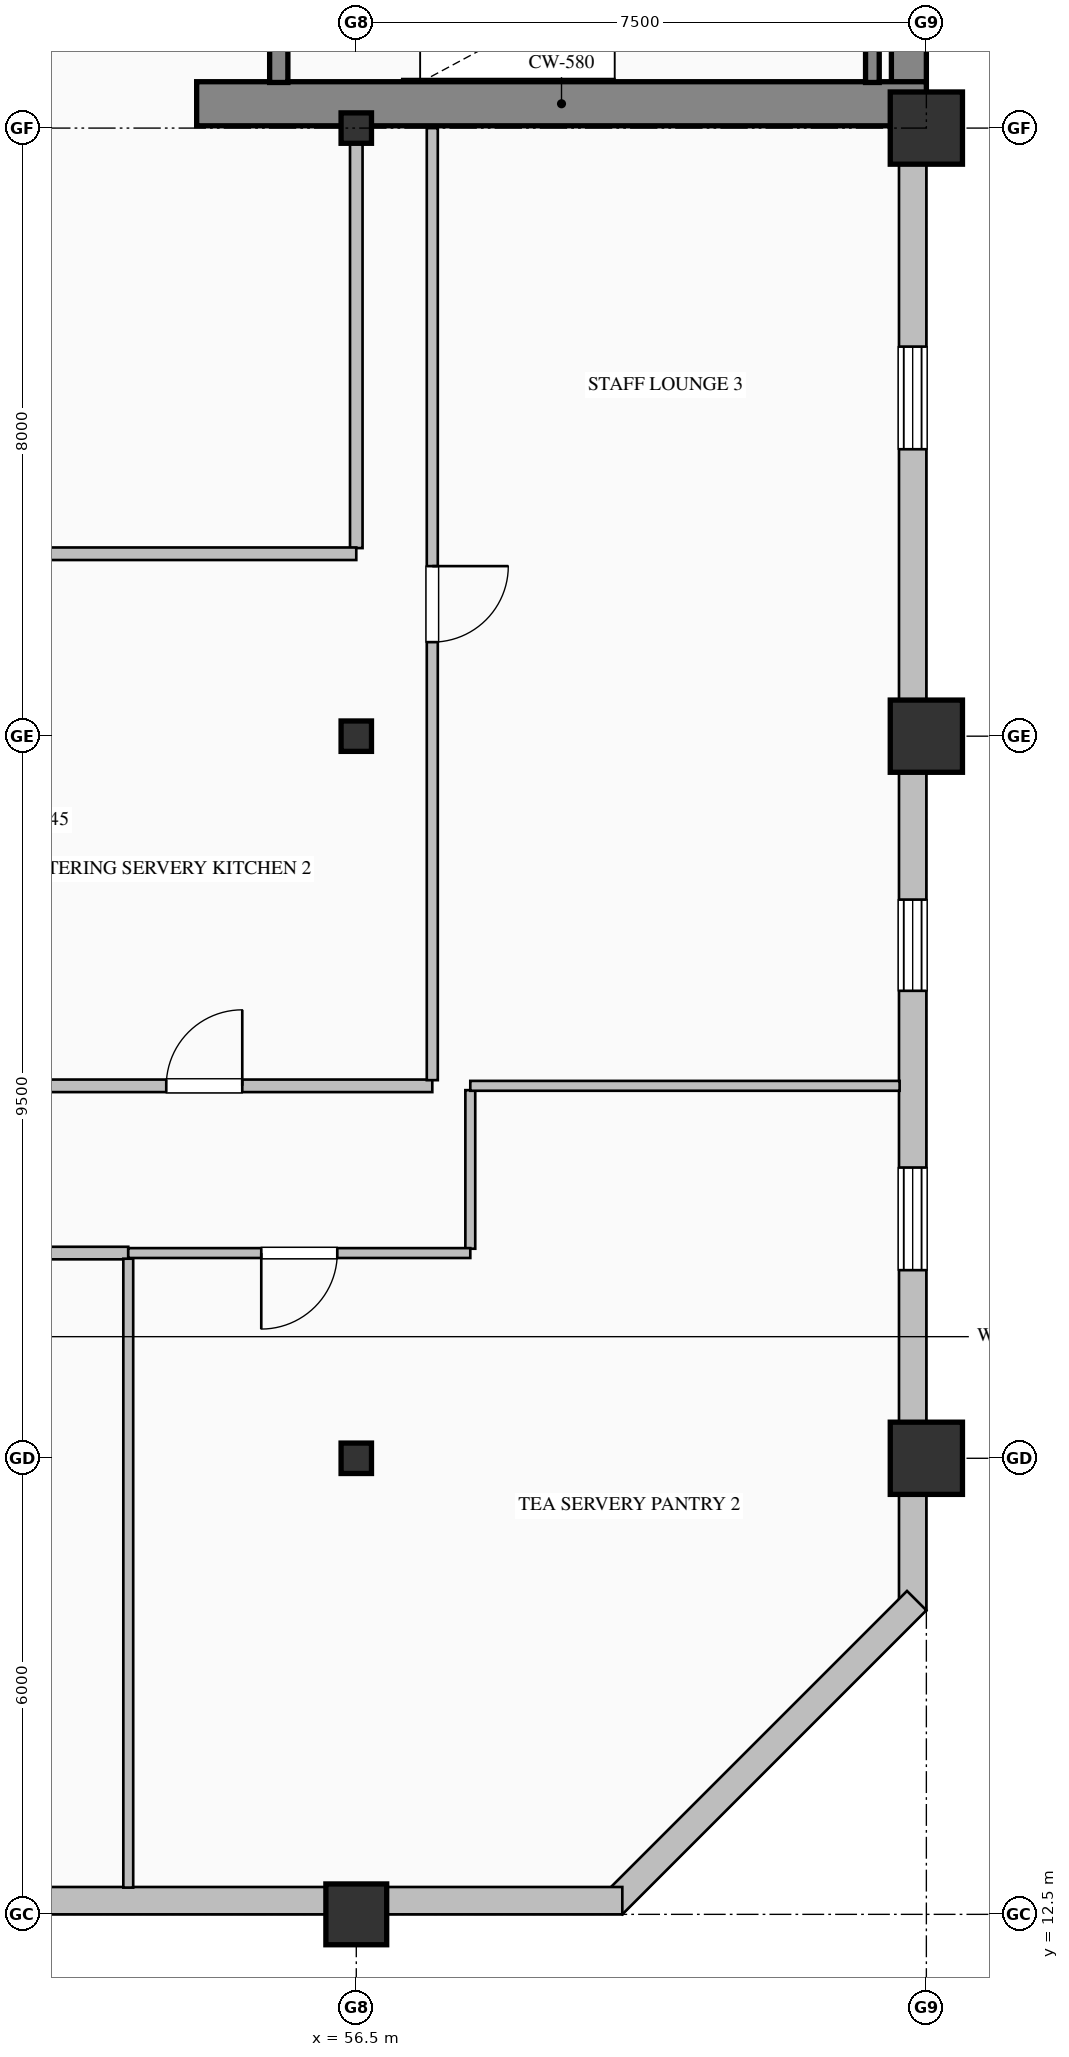
"""IFC4 building model, lengths in metres.
Left out: names, types, materials, properties, quantities, classifications, styles, units other than length and angle.
Written with IfcOpenShell. Run it as: python <this file> out.ifc"""

import sys

from ifc_helpers import new_model, si_unit, direction, frame, frame_2d, origin, origin_2d, place, context, subcontext, project, spatial, rectangle, hollow_rectangle, i_section, extrude, element, fill, save


model = new_model("IFC4")
c1 = context("Model", 3, precision=1e-05, world=origin(), true_north=direction((0.0, 1.0)))
c2 = subcontext(c1, "Body", "Model", "MODEL_VIEW")
j1 = project(units=[si_unit("LENGTHUNIT", "METRE"), si_unit("PLANEANGLEUNIT", "RADIAN")], contexts=[c1])
p1 = place(None, origin())
s1 = spatial("IfcSite", under=j1, at=p1, CompositionType="ELEMENT")
p2 = place(p1, origin())
s2 = spatial("IfcBuilding", under=s1, at=p2, CompositionType="ELEMENT")
p3 = place(p2, frame((0.0, 0.0, 241.8)))
s3 = spatial("IfcBuildingStorey", under=s2, at=p3, CompositionType="ELEMENT", Elevation=241.8)
p4 = place(p3, frame((63.77, 36.32, 0.0), z_axis=(0.0, 0.0, 1.0), x_axis=(0.0, 1.0, 0.0)))
e1 = element("IfcWall", 1, at=p4, inside=s3, PredefinedType="SHEAR", context=c2, shape_type="SweptSolid", body=[
    extrude(rectangle(XDim=15.22, YDim=0.46, at=frame_2d((7.61, 0.0))), origin(), (0.0, 0.0, 1.0), 3.775),
])
p5 = place(p3, frame((54.4, 36.32, 0.0), z_axis=(0.0, 0.0, 1.0), x_axis=(1.0, 0.0, 0.0)))
e2 = element("IfcWall", 2, at=p5, inside=s3, PredefinedType="SHEAR", context=c2, shape_type="SweptSolid", body=[
    extrude(rectangle(XDim=9.6, YDim=0.58, at=frame_2d((4.8, 0.0))), origin(), (0.0, 0.0, 1.0), 4.0),
])
p6 = place(p3, frame((56.5, 12.5, 0.0), z_axis=(0.0, 0.0, 1.0), x_axis=(1.0, 0.0, 0.0)))
e3 = element("IfcColumn", 3, at=p6, inside=s3, PredefinedType="COLUMN", context=c2, shape_type="SweptSolid", body=[
    extrude(hollow_rectangle(XDim=0.8, YDim=0.8, WallThickness=0.032, at=origin_2d()), origin(), (0.0, 0.0, 1.0), 4.0),
])
for number, where, z_axis, x_axis in (
    (4, (56.5, 18.5, 0.0), (0.0, 0.0, 1.0), (1.0, 0.0, 0.0)),
    (5, (56.5, 28.0, 0.0), (0.0, 0.0, 1.0), (1.0, 0.0, 0.0)),
    (6, (56.5, 36.0, 0.0), (0.0, 0.0, 1.0), (1.0, 0.0, 0.0)),
):
    element("IfcColumn", number, at=place(p3, frame(where, z_axis=z_axis, x_axis=x_axis)), inside=s3, PredefinedType="COLUMN", context=c2, shape_type="SweptSolid", body=[
        extrude(i_section(OverallWidth=0.4, OverallDepth=0.4, WebThickness=0.013, FlangeThickness=0.021, FilletRadius=0.022, at=origin_2d()), origin(), (0.0, 0.0, 1.0), 4.0),
    ])
for number, where, z_axis, x_axis in (
    (7, (64.0, 18.5, 0.0), (0.0, 0.0, 1.0), (1.0, 0.0, 0.0)),
    (8, (64.0, 28.0, 0.0), (0.0, 0.0, 1.0), (1.0, 0.0, 0.0)),
    (9, (64.0, 36.0, 0.0), (0.0, 0.0, 1.0), (1.0, 0.0, 0.0)),
):
    element("IfcColumn", number, at=place(p3, frame(where, z_axis=z_axis, x_axis=x_axis)), inside=s3, PredefinedType="COLUMN", context=c2, shape_type="SweptSolid", body=[
        extrude(hollow_rectangle(XDim=0.95, YDim=0.95, WallThickness=0.036, at=origin_2d()), origin(), (0.0, 0.0, 1.0), 4.0),
    ])
p7 = place(p3, frame((63.82, 36.05, 0.0), z_axis=(0.0, 0.0, 1.0), x_axis=(0.0, -1.0, 0.0)))
e10 = element("IfcWall", 10, at=p7, inside=s3, PredefinedType="SOLIDWALL", context=c2, shape_type="SweptSolid", body=[
    extrude(rectangle(XDim=19.55, YDim=0.36, at=frame_2d((9.775, 0.0))), origin(), (0.0, 0.0, 1.0), 3.325),
])
p8 = place(p7, frame((2.925, 0.0, 0.9)))
e11 = element("IfcOpeningElement", 11, at=p8, cuts=e10, PredefinedType="OPENING", context=c2, shape_type="SweptSolid", body=[
    extrude(rectangle(XDim=1.35, YDim=1.85, at=frame_2d((0.675, 0.925))), frame((0.0, 0.19, 0.0), z_axis=(0.0, -1.0, 0.0), x_axis=(1.0, 0.0, 0.0)), (0.0, 0.0, 1.0), 0.38),
])
p9 = place(p7, frame((10.2, 0.0, 0.9)))
e12 = element("IfcOpeningElement", 12, at=p9, cuts=e10, PredefinedType="OPENING", context=c2, shape_type="SweptSolid", body=[
    extrude(rectangle(XDim=1.2, YDim=1.85, at=frame_2d((0.6, 0.925))), frame((0.0, 0.19, 0.0), z_axis=(0.0, -1.0, 0.0), x_axis=(1.0, 0.0, 0.0)), (0.0, 0.0, 1.0), 0.38),
])
p10 = place(p7, frame((13.725, 0.0, 0.9)))
e13 = element("IfcOpeningElement", 13, at=p10, cuts=e10, PredefinedType="OPENING", context=c2, shape_type="SweptSolid", body=[
    extrude(rectangle(XDim=1.35, YDim=1.85, at=frame_2d((0.675, 0.925))), frame((0.0, 0.19, 0.0), z_axis=(0.0, -1.0, 0.0), x_axis=(1.0, 0.0, 0.0)), (0.0, 0.0, 1.0), 0.38),
])
p11 = place(p3, frame((63.873, 16.627, 0.0), z_axis=(0.0, 0.0, 1.0), x_axis=(-0.707106781187, -0.707106781187, 0.0)))
e14 = element("IfcWall", 14, at=p11, inside=s3, PredefinedType="SOLIDWALL", context=c2, shape_type="SweptSolid", body=[
    extrude(rectangle(XDim=5.657, YDim=0.36, at=frame_2d((2.828, 0.0))), origin(), (0.0, 0.0, 1.0), 3.775),
])
p12 = place(p3, frame((60.0, 12.68, 0.0), z_axis=(0.0, 0.0, 1.0), x_axis=(-1.0, 0.0, 0.0)))
e15 = element("IfcWall", 15, at=p12, inside=s3, PredefinedType="SOLIDWALL", context=c2, shape_type="SweptSolid", body=[
    extrude(rectangle(XDim=15.5, YDim=0.36, at=frame_2d((7.75, 0.0))), origin(), (0.0, 0.0, 1.0), 3.325),
])
p13 = place(p3, frame((55.48, 39.75, 0.0), z_axis=(0.0, 0.0, 1.0), x_axis=(0.0, -1.0, 0.0)))
e16 = element("IfcWall", 16, at=p13, inside=s3, PredefinedType="SOLIDWALL", context=c2, shape_type="SweptSolid", body=[
    extrude(rectangle(XDim=3.15, YDim=0.24, at=frame_2d((1.575, 0.0))), origin(), (0.0, 0.0, 1.0), 4.0),
])
p14 = place(p13, frame((1.0, 0.0, 0.0)))
e17 = element("IfcOpeningElement", 17, at=p14, cuts=e16, PredefinedType="OPENING", context=c2, shape_type="SweptSolid", body=[
    extrude(rectangle(XDim=1.15, YDim=2.2, at=frame_2d((0.575, 1.1))), frame((0.0, 0.13, 0.0), z_axis=(0.0, -1.0, 0.0), x_axis=(1.0, 0.0, 0.0)), (0.0, 0.0, 1.0), 0.26),
])
p15 = place(p3, frame((63.29, 36.6, 0.0), z_axis=(0.0, 0.0, 1.0), x_axis=(0.0, 1.0, 0.0)))
e18 = element("IfcWall", 18, at=p15, inside=s3, PredefinedType="SOLIDWALL", context=c2, shape_type="SweptSolid", body=[
    extrude(rectangle(XDim=3.15, YDim=0.18, at=frame_2d((1.575, 0.0))), origin(), (0.0, 0.0, 1.0), 4.0),
])
p16 = place(p3, frame((56.5, 36.0, 0.0), z_axis=(0.0, 0.0, 1.0), x_axis=(0.0, -1.0, 0.0)))
e19 = element("IfcWall", 19, at=p16, inside=s3, PredefinedType="PARTITIONING", context=c2, shape_type="SweptSolid", body=[
    extrude(rectangle(XDim=5.525, YDim=0.165, at=frame_2d((2.763, 0.0))), origin(), (0.0, 0.0, 1.0), 3.179),
])
p17 = place(p3, frame((56.5, 30.4, 0.0), z_axis=(0.0, 0.0, 1.0), x_axis=(-1.0, 0.0, 0.0)))
e20 = element("IfcWall", 20, at=p17, inside=s3, PredefinedType="PARTITIONING", context=c2, shape_type="SweptSolid", body=[
    extrude(rectangle(XDim=5.0, YDim=0.165, at=frame_2d((2.5, 0.0))), origin(), (0.0, 0.0, 1.0), 3.775),
])
p18 = place(p3, frame((51.5, 23.4, 0.0), z_axis=(0.0, 0.0, 1.0), x_axis=(1.0, 0.0, 0.0)))
e21 = element("IfcWall", 21, at=p18, inside=s3, PredefinedType="PARTITIONING", context=c2, shape_type="SweptSolid", body=[
    extrude(rectangle(XDim=6.0, YDim=0.165, at=frame_2d((3.0, 0.0))), origin(), (0.0, 0.0, 1.0), 3.467),
])
p19 = place(p18, frame((2.5, 0.0, 0.0)))
e22 = element("IfcOpeningElement", 22, at=p19, cuts=e21, PredefinedType="OPENING", context=c2, shape_type="SweptSolid", body=[
    extrude(rectangle(XDim=1.0, YDim=2.15, at=frame_2d((0.5, 1.075))), frame((0.0, 0.093, 0.0), z_axis=(0.0, -1.0, 0.0), x_axis=(1.0, 0.0, 0.0)), (0.0, 0.0, 1.0), 0.185),
])
p20 = place(p3, frame((53.5, 21.2, 0.0), z_axis=(0.0, 0.0, 1.0), x_axis=(-1.0, 0.0, 0.0)))
e23 = element("IfcWall", 23, at=p20, inside=s3, PredefinedType="PARTITIONING", context=c2, shape_type="SweptSolid", body=[
    extrude(rectangle(XDim=8.3, YDim=0.165, at=frame_2d((4.15, 0.0))), origin(), (0.0, 0.0, 1.0), 3.775),
])
p21 = place(p3, frame((58.0, 23.343, 0.0), z_axis=(0.0, 0.0, 1.0), x_axis=(0.0, -1.0, 0.0)))
e24 = element("IfcWall", 24, at=p21, inside=s3, PredefinedType="PARTITIONING", context=c2, shape_type="SweptSolid", body=[
    extrude(rectangle(XDim=2.086, YDim=0.13, at=frame_2d((1.043, 0.0))), origin(), (0.0, 0.0, 1.0), 3.775),
])
p22 = place(p3, frame((58.0, 21.2, 0.0), z_axis=(0.0, 0.0, 1.0), x_axis=(-1.0, 0.0, 0.0)))
e25 = element("IfcWall", 25, at=p22, inside=s3, PredefinedType="PARTITIONING", context=c2, shape_type="SweptSolid", body=[
    extrude(rectangle(XDim=4.5, YDim=0.13, at=frame_2d((2.25, 0.0))), origin(), (0.0, 0.0, 1.0), 3.775),
])
p23 = place(p22, frame((1.75, 0.0, 0.0)))
e26 = element("IfcOpeningElement", 26, at=p23, cuts=e25, PredefinedType="OPENING", context=c2, shape_type="SweptSolid", body=[
    extrude(rectangle(XDim=1.0, YDim=2.15, at=frame_2d((0.5, 1.075))), frame((0.0, 0.075, 0.0), z_axis=(0.0, -1.0, 0.0), x_axis=(1.0, 0.0, 0.0)), (0.0, 0.0, 1.0), 0.15),
])
p24 = place(p3, frame((57.5, 36.0, 0.0), z_axis=(0.0, 0.0, 1.0), x_axis=(0.0, -1.0, 0.0)))
e27 = element("IfcWall", 27, at=p24, inside=s3, PredefinedType="PARTITIONING", context=c2, shape_type="SweptSolid", body=[
    extrude(rectangle(XDim=12.525, YDim=0.145, at=frame_2d((6.263, 0.0))), origin(), (0.0, 0.0, 1.0), 3.775),
])
p25 = place(p24, frame((5.763, 0.0, 0.0)))
e28 = element("IfcOpeningElement", 28, at=p25, cuts=e27, PredefinedType="OPENING", context=c2, shape_type="SweptSolid", body=[
    extrude(rectangle(XDim=1.0, YDim=2.15, at=frame_2d((0.5, 1.075))), frame((0.0, 0.083, 0.0), z_axis=(0.0, -1.0, 0.0), x_axis=(1.0, 0.0, 0.0)), (0.0, 0.0, 1.0), 0.165),
])
p26 = place(p3, frame((63.648, 23.4, 0.0), z_axis=(0.0, 0.0, 1.0), x_axis=(-1.0, 0.0, 0.0)))
e29 = element("IfcWall", 29, at=p26, inside=s3, PredefinedType="PARTITIONING", context=c2, shape_type="SweptSolid", body=[
    extrude(rectangle(XDim=5.648, YDim=0.13, at=frame_2d((2.824, 0.0))), origin(), (0.0, 0.0, 1.0), 3.775),
])
p27 = place(p3, frame((53.5, 21.125, 0.0), z_axis=(0.0, 0.0, 1.0), x_axis=(0.0, -1.0, 0.0)))
e30 = element("IfcWall", 30, at=p27, inside=s3, PredefinedType="PARTITIONING", context=c2, shape_type="SweptSolid", body=[
    extrude(rectangle(XDim=8.273, YDim=0.13, at=frame_2d((4.137, 0.0))), origin(), (0.0, 0.0, 1.0), 3.775),
])
p28 = place(p8, origin())
e31 = element("IfcWindow", 31, at=p28, inside=s3, PartitioningType="DOUBLE_PANEL_VERTICAL", PredefinedType="WINDOW", context=c2, shape_type="SweptSolid", body=[
    extrude(rectangle(XDim=1.35, YDim=1.85, at=frame_2d((0.675, 0.925))), frame((0.0, 0.15, 0.0), z_axis=(0.0, -1.0, 0.0), x_axis=(1.0, 0.0, 0.0)), (0.0, 0.0, 1.0), 0.06),
])
fill(e11, e31)
p29 = place(p9, origin())
e32 = element("IfcWindow", 32, at=p29, inside=s3, PartitioningType="DOUBLE_PANEL_VERTICAL", PredefinedType="WINDOW", context=c2, shape_type="SweptSolid", body=[
    extrude(rectangle(XDim=1.2, YDim=1.85, at=frame_2d((0.6, 0.925))), frame((0.0, 0.15, 0.0), z_axis=(0.0, -1.0, 0.0), x_axis=(1.0, 0.0, 0.0)), (0.0, 0.0, 1.0), 0.06),
])
fill(e12, e32)
p30 = place(p10, origin())
e33 = element("IfcWindow", 33, at=p30, inside=s3, PartitioningType="DOUBLE_PANEL_VERTICAL", PredefinedType="WINDOW", context=c2, shape_type="SweptSolid", body=[
    extrude(rectangle(XDim=1.35, YDim=1.85, at=frame_2d((0.675, 0.925))), frame((0.0, 0.15, 0.0), z_axis=(0.0, -1.0, 0.0), x_axis=(1.0, 0.0, 0.0)), (0.0, 0.0, 1.0), 0.06),
])
fill(e13, e33)
p31 = place(p19, origin())
e34 = element("IfcDoor", 34, at=p31, inside=s3, OperationType="SINGLE_SWING_RIGHT", PredefinedType="DOOR", context=c2, shape_type="SweptSolid", body=[
    extrude(rectangle(XDim=1.0, YDim=2.15, at=frame_2d((0.5, 1.075))), frame((0.0, 0.025, 0.0), z_axis=(0.0, -1.0, 0.0), x_axis=(1.0, 0.0, 0.0)), (0.0, 0.0, 1.0), 0.05),
])
fill(e22, e34)
p32 = place(p25, origin())
e35 = element("IfcDoor", 35, at=p32, inside=s3, OperationType="SINGLE_SWING_LEFT", PredefinedType="DOOR", context=c2, shape_type="SweptSolid", body=[
    extrude(rectangle(XDim=1.0, YDim=2.15, at=frame_2d((0.5, 1.075))), frame((0.0, 0.025, 0.0), z_axis=(0.0, -1.0, 0.0), x_axis=(1.0, 0.0, 0.0)), (0.0, 0.0, 1.0), 0.05),
])
fill(e28, e35)
p33 = place(p23, origin())
e36 = element("IfcDoor", 36, at=p33, inside=s3, OperationType="SINGLE_SWING_RIGHT", PredefinedType="DOOR", context=c2, shape_type="SweptSolid", body=[
    extrude(rectangle(XDim=1.0, YDim=2.15, at=frame_2d((0.5, 1.075))), frame((0.0, 0.025, 0.0), z_axis=(0.0, -1.0, 0.0), x_axis=(1.0, 0.0, 0.0)), (0.0, 0.0, 1.0), 0.05),
])
fill(e26, e36)
save(model, sys.argv[1])
